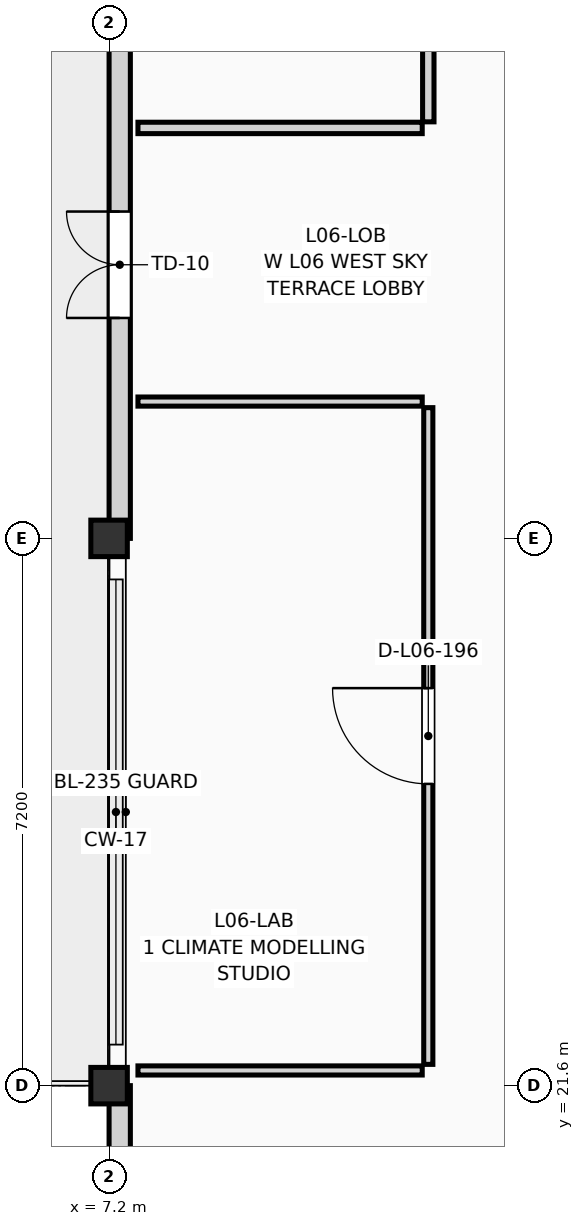
"""IFC4 building model, lengths in metres.
Left out: names, types, materials, properties, quantities, classifications, styles, units other than length and angle.
Written with IfcOpenShell. Run it as: python <this file> out.ifc"""

import sys

from ifc_helpers import new_model, si_unit, direction, frame, frame_2d, origin, origin_2d, place, context, subcontext, project, spatial, rectangle, extrude, element, fill, save


model = new_model("IFC4")
c1 = context("Model", 3, precision=1e-05, world=origin(), true_north=direction((0.0, 1.0)))
c2 = subcontext(c1, "Body", "Model", "MODEL_VIEW")
j1 = project(units=[si_unit("LENGTHUNIT", "METRE"), si_unit("PLANEANGLEUNIT", "RADIAN")], contexts=[c1])
p1 = place(None, origin())
s1 = spatial("IfcSite", under=j1, at=p1, CompositionType="ELEMENT")
p2 = place(p1, origin())
s2 = spatial("IfcBuilding", under=s1, at=p2, CompositionType="ELEMENT")
p3 = place(p2, frame((0.0, 0.0, 22.95)))
s3 = spatial("IfcBuildingStorey", under=s2, at=p3, CompositionType="ELEMENT", Elevation=22.95)
for number, where, z_axis, x_axis in (
    (1, (7.2, 21.6, 0.0), (0.0, 0.0, 1.0), (1.0, 0.0, 0.0)),
    (2, (7.2, 28.8, 0.0), (0.0, 0.0, 1.0), (1.0, 0.0, 0.0)),
):
    element("IfcColumn", number, at=place(p3, frame(where, z_axis=z_axis, x_axis=x_axis)), inside=s3, PredefinedType="COLUMN", context=c2, shape_type="SweptSolid", body=[
        extrude(rectangle(XDim=0.48, YDim=0.48, at=origin_2d()), origin(), (0.0, 0.0, 1.0), 3.3),
    ])
p4 = place(p3, frame((7.34, 14.4, 0.0), z_axis=(0.0, 0.0, 1.0), x_axis=(0.0, 1.0, 0.0)))
e3 = element("IfcWall", 3, at=p4, inside=s3, PredefinedType="SOLIDWALL", context=c2, shape_type="SweptSolid", body=[
    extrude(rectangle(XDim=7.2, YDim=0.28, at=frame_2d((3.6, 0.0))), origin(), (0.0, 0.0, 1.0), 2.54),
])
p5 = place(p3, frame((7.34, 28.8, 0.0), z_axis=(0.0, 0.0, 1.0), x_axis=(0.0, 1.0, 0.0)))
e4 = element("IfcWall", 4, at=p5, inside=s3, PredefinedType="SOLIDWALL", context=c2, shape_type="SweptSolid", body=[
    extrude(rectangle(XDim=7.2, YDim=0.28, at=frame_2d((3.6, 0.0))), origin(), (0.0, 0.0, 1.0), 2.54),
])
p6 = place(p5, frame((2.9, 0.0, 0.0)))
e5 = element("IfcOpeningElement", 5, at=p6, cuts=e4, PredefinedType="OPENING", context=c2, shape_type="SweptSolid", body=[
    extrude(rectangle(XDim=1.4, YDim=2.2, at=frame_2d((0.7, 1.1))), frame((0.0, 0.152, 0.0), z_axis=(0.0, -1.0, 0.0), x_axis=(1.0, 0.0, 0.0)), (0.0, 0.0, 1.0), 0.304),
])
p7 = place(p3, frame((7.58, 21.8, 0.0), z_axis=(0.0, 0.0, 1.0), x_axis=(1.0, 0.0, 0.0)))
e6 = element("IfcWall", 6, at=p7, inside=s3, PredefinedType="PARTITIONING", context=c2, shape_type="SweptSolid", body=[
    extrude(rectangle(XDim=3.74, YDim=0.12, at=frame_2d((1.87, 0.0))), origin(), (0.0, 0.0, 1.0), 2.415),
])
p8 = place(p3, frame((11.4, 21.88, 0.0), z_axis=(0.0, 0.0, 1.0), x_axis=(0.0, 1.0, 0.0)))
e7 = element("IfcWall", 7, at=p8, inside=s3, PredefinedType="PARTITIONING", context=c2, shape_type="SweptSolid", body=[
    extrude(rectangle(XDim=8.64, YDim=0.12, at=frame_2d((4.32, 0.0))), origin(), (0.0, 0.0, 1.0), 3.075),
])
p9 = place(p8, frame((3.69, 0.0, 0.0)))
e8 = element("IfcOpeningElement", 8, at=p9, cuts=e7, PredefinedType="OPENING", context=c2, shape_type="SweptSolid", body=[
    extrude(rectangle(XDim=1.26, YDim=2.18, at=frame_2d((0.63, 1.09))), frame((0.0, 0.072, 0.0), z_axis=(0.0, -1.0, 0.0), x_axis=(1.0, 0.0, 0.0)), (0.0, 0.0, 1.0), 0.144),
])
p10 = place(p3, frame((7.58, 30.6, 0.0), z_axis=(0.0, 0.0, 1.0), x_axis=(1.0, 0.0, 0.0)))
e9 = element("IfcWall", 9, at=p10, inside=s3, PredefinedType="PARTITIONING", context=c2, shape_type="SweptSolid", body=[
    extrude(rectangle(XDim=3.74, YDim=0.12, at=frame_2d((1.87, 0.0))), origin(), (0.0, 0.0, 1.0), 3.075),
])
p11 = place(p3, frame((7.58, 34.2, 0.0), z_axis=(0.0, 0.0, 1.0), x_axis=(1.0, 0.0, 0.0)))
e10 = element("IfcWall", 10, at=p11, inside=s3, PredefinedType="PARTITIONING", context=c2, shape_type="SweptSolid", body=[
    extrude(rectangle(XDim=3.74, YDim=0.15, at=frame_2d((1.87, 0.0))), origin(), (0.0, 0.0, 1.0), 3.075),
])
p12 = place(p3, frame((11.4, 34.28, 0.0), z_axis=(0.0, 0.0, 1.0), x_axis=(0.0, 1.0, 0.0)))
e11 = element("IfcWall", 11, at=p12, inside=s3, PredefinedType="PARTITIONING", context=c2, shape_type="SweptSolid", body=[
    extrude(rectangle(XDim=10.64, YDim=0.15, at=frame_2d((5.32, 0.0))), origin(), (0.0, 0.0, 1.0), 3.075),
])
p13 = place(p12, frame((4.61, 0.0, 0.0)))
e12 = element("IfcOpeningElement", 12, at=p13, cuts=e11, PredefinedType="OPENING", context=c2, shape_type="SweptSolid", body=[
    extrude(rectangle(XDim=1.42, YDim=2.22, at=frame_2d((0.71, 1.11))), frame((0.0, 0.087, 0.0), z_axis=(0.0, -1.0, 0.0), x_axis=(1.0, 0.0, 0.0)), (0.0, 0.0, 1.0), 0.174),
])
p14 = place(p6, origin())
e13 = element("IfcDoor", 13, at=p14, inside=s3, OperationType="DOUBLE_DOOR_SINGLE_SWING", PredefinedType="DOOR", context=c2, shape_type="SweptSolid", body=[
    extrude(rectangle(XDim=1.4, YDim=2.2, at=frame_2d((0.7, 1.1))), frame((0.0, 0.025, 0.0), z_axis=(0.0, -1.0, 0.0), x_axis=(1.0, 0.0, 0.0)), (0.0, 0.0, 1.0), 0.05),
])
fill(e5, e13)
p15 = place(p9, origin())
e14 = element("IfcDoor", 14, at=p15, inside=s3, OperationType="SINGLE_SWING_RIGHT", PredefinedType="DOOR", context=c2, shape_type="SweptSolid", body=[
    extrude(rectangle(XDim=1.26, YDim=2.18, at=frame_2d((0.63, 1.09))), frame((0.0, 0.025, 0.0), z_axis=(0.0, -1.0, 0.0), x_axis=(1.0, 0.0, 0.0)), (0.0, 0.0, 1.0), 0.05),
])
fill(e8, e14)
save(model, sys.argv[1])
